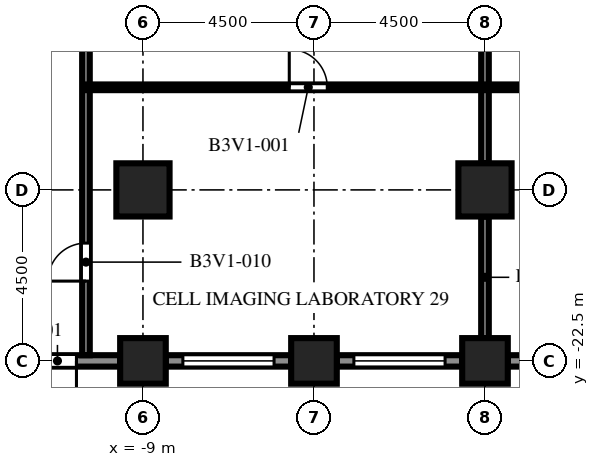
"""IFC4 building model, lengths in metres.
Left out: names, types, materials, properties, quantities, classifications, styles, units other than length and angle.
Written with IfcOpenShell. Run it as: python <this file> out.ifc"""

import sys

from ifc_helpers import new_model, si_unit, direction, frame, frame_2d, origin, origin_2d, place, context, subcontext, project, spatial, rectangle, extrude, element, fill, save


model = new_model("IFC4")
c1 = context("Model", 3, precision=1e-05, world=origin(), true_north=direction((0.0, 1.0)))
c2 = subcontext(c1, "Body", "Model", "MODEL_VIEW")
j1 = project(units=[si_unit("LENGTHUNIT", "METRE"), si_unit("PLANEANGLEUNIT", "RADIAN")], contexts=[c1])
p1 = place(None, origin())
s1 = spatial("IfcSite", under=j1, at=p1, CompositionType="ELEMENT")
p2 = place(p1, origin())
s2 = spatial("IfcBuilding", under=s1, at=p2, CompositionType="ELEMENT")
p3 = place(p2, frame((0.0, 0.0, 94.3)))
s3 = spatial("IfcBuildingStorey", under=s2, at=p3, CompositionType="ELEMENT", Elevation=94.3)
for number, where, z_axis, x_axis in (
    (1, (-9.0, -22.5, 0.0), (0.0, 0.0, 1.0), (1.0, 0.0, 0.0)),
    (2, (-4.5, -22.5, 0.0), (0.0, 0.0, 1.0), (1.0, 0.0, 0.0)),
    (3, (0.0, -22.5, 0.0), (0.0, 0.0, 1.0), (1.0, 0.0, 0.0)),
):
    element("IfcColumn", number, at=place(p3, frame(where, z_axis=z_axis, x_axis=x_axis)), inside=s3, PredefinedType="COLUMN", context=c2, shape_type="SweptSolid", body=[
        extrude(rectangle(XDim=1.2, YDim=1.2, at=origin_2d()), origin(), (0.0, 0.0, 1.0), 4.1),
    ])
for number, where, z_axis, x_axis in (
    (4, (-9.0, -18.0, 0.0), (0.0, 0.0, 1.0), (1.0, 0.0, 0.0)),
    (5, (0.0, -18.0, 0.0), (0.0, 0.0, 1.0), (1.0, 0.0, 0.0)),
):
    element("IfcColumn", number, at=place(p3, frame(where, z_axis=z_axis, x_axis=x_axis)), inside=s3, PredefinedType="COLUMN", context=c2, shape_type="SweptSolid", body=[
        extrude(rectangle(XDim=1.4, YDim=1.4, at=origin_2d()), origin(), (0.0, 0.0, 1.0), 4.1),
    ])
p4 = place(p3, frame((-9.6, -22.5, 0.0), z_axis=(0.0, 0.0, 1.0), x_axis=(-1.0, 0.0, 0.0)))
e6 = element("IfcWall", 6, at=p4, inside=s3, PredefinedType="SOLIDWALL", context=c2, shape_type="SweptSolid", body=[
    extrude(rectangle(XDim=3.3, YDim=0.3, at=frame_2d((1.65, 0.0))), origin(), (0.0, 0.0, 1.0), 2.75),
])
p5 = place(p4, frame((1.15, 0.0, 0.0)))
e7 = element("IfcOpeningElement", 7, at=p5, cuts=e6, PredefinedType="OPENING", context=c2, shape_type="SweptSolid", body=[
    extrude(rectangle(XDim=1.0, YDim=2.2, at=frame_2d((0.5, 1.1))), frame((0.0, 0.16, 0.0), z_axis=(0.0, -1.0, 0.0), x_axis=(1.0, 0.0, 0.0)), (0.0, 0.0, 1.0), 0.32),
])
p6 = place(p3, frame((-5.1, -22.5, 0.0), z_axis=(0.0, 0.0, 1.0), x_axis=(-1.0, 0.0, 0.0)))
e8 = element("IfcWall", 8, at=p6, inside=s3, PredefinedType="SOLIDWALL", context=c2, shape_type="SweptSolid", body=[
    extrude(rectangle(XDim=3.3, YDim=0.3, at=frame_2d((1.65, 0.0))), origin(), (0.0, 0.0, 1.0), 2.75),
])
p7 = place(p6, frame((0.45, 0.0, 0.8)))
e9 = element("IfcOpeningElement", 9, at=p7, cuts=e8, PredefinedType="OPENING", context=c2, shape_type="SweptSolid", body=[
    extrude(rectangle(XDim=2.4, YDim=1.7, at=frame_2d((1.2, 0.85))), frame((0.0, 0.16, 0.0), z_axis=(0.0, -1.0, 0.0), x_axis=(1.0, 0.0, 0.0)), (0.0, 0.0, 1.0), 0.32),
])
p8 = place(p3, frame((-0.6, -22.5, 0.0), z_axis=(0.0, 0.0, 1.0), x_axis=(-1.0, 0.0, 0.0)))
e10 = element("IfcWall", 10, at=p8, inside=s3, PredefinedType="SOLIDWALL", context=c2, shape_type="SweptSolid", body=[
    extrude(rectangle(XDim=3.3, YDim=0.3, at=frame_2d((1.65, 0.0))), origin(), (0.0, 0.0, 1.0), 2.75),
])
p9 = place(p8, frame((0.45, 0.0, 0.8)))
e11 = element("IfcOpeningElement", 11, at=p9, cuts=e10, PredefinedType="OPENING", context=c2, shape_type="SweptSolid", body=[
    extrude(rectangle(XDim=2.4, YDim=1.7, at=frame_2d((1.2, 0.85))), frame((0.0, 0.16, 0.0), z_axis=(0.0, -1.0, 0.0), x_axis=(1.0, 0.0, 0.0)), (0.0, 0.0, 1.0), 0.32),
])
p10 = place(p3, frame((3.9, -22.5, 0.0), z_axis=(0.0, 0.0, 1.0), x_axis=(-1.0, 0.0, 0.0)))
e12 = element("IfcWall", 12, at=p10, inside=s3, PredefinedType="SOLIDWALL", context=c2, shape_type="SweptSolid", body=[
    extrude(rectangle(XDim=3.3, YDim=0.3, at=frame_2d((1.65, 0.0))), origin(), (0.0, 0.0, 1.0), 2.75),
])
p11 = place(p10, frame((0.45, 0.0, 0.8)))
e13 = element("IfcOpeningElement", 13, at=p11, cuts=e12, PredefinedType="OPENING", context=c2, shape_type="SweptSolid", body=[
    extrude(rectangle(XDim=2.4, YDim=1.7, at=frame_2d((1.2, 0.85))), frame((0.0, 0.16, 0.0), z_axis=(0.0, -1.0, 0.0), x_axis=(1.0, 0.0, 0.0)), (0.0, 0.0, 1.0), 0.32),
])
p12 = place(p3, frame((-10.5, -9.0, 0.0), z_axis=(0.0, 0.0, 1.0), x_axis=(0.0, -1.0, 0.0)))
e14 = element("IfcWall", 14, at=p12, inside=s3, PredefinedType="PARTITIONING", context=c2, shape_type="SweptSolid", body=[
    extrude(rectangle(XDim=13.35, YDim=0.2, at=frame_2d((6.675, 0.0))), origin(), (0.0, 0.0, 1.0), 3.65),
])
p13 = place(p12, frame((10.4, 0.0, 0.0)))
e15 = element("IfcOpeningElement", 15, at=p13, cuts=e14, PredefinedType="OPENING", context=c2, shape_type="SweptSolid", body=[
    extrude(rectangle(XDim=1.0, YDim=2.1, at=frame_2d((0.5, 1.05))), frame((0.0, 0.11, 0.0), z_axis=(0.0, -1.0, 0.0), x_axis=(1.0, 0.0, 0.0)), (0.0, 0.0, 1.0), 0.22),
])
p14 = place(p3, frame((0.0, -21.9, 0.0), z_axis=(0.0, 0.0, 1.0), x_axis=(0.0, 1.0, 0.0)))
e16 = element("IfcWall", 16, at=p14, inside=s3, PredefinedType="PARTITIONING", context=c2, shape_type="SweptSolid", body=[
    extrude(rectangle(XDim=3.2, YDim=0.2, at=frame_2d((1.6, 0.0))), origin(), (0.0, 0.0, 1.0), 3.65),
])
p15 = place(p3, frame((0.0, -17.3, 0.0), z_axis=(0.0, 0.0, 1.0), x_axis=(0.0, 1.0, 0.0)))
e17 = element("IfcWall", 17, at=p15, inside=s3, PredefinedType="PARTITIONING", context=c2, shape_type="SweptSolid", body=[
    extrude(rectangle(XDim=8.3, YDim=0.2, at=frame_2d((4.15, 0.0))), origin(), (0.0, 0.0, 1.0), 3.65),
])
p16 = place(p3, frame((-10.5, -15.3, 0.0), z_axis=(0.0, 0.0, 1.0), x_axis=(1.0, 0.0, 0.0)))
e18 = element("IfcWall", 18, at=p16, inside=s3, PredefinedType="PARTITIONING", context=c2, shape_type="SweptSolid", body=[
    extrude(rectangle(XDim=28.5, YDim=0.15, at=frame_2d((14.25, 0.0))), origin(), (0.0, 0.0, 1.0), 3.65),
])
p17 = place(p16, frame((5.35, 0.0, 0.0)))
e19 = element("IfcOpeningElement", 19, at=p17, cuts=e18, PredefinedType="OPENING", context=c2, shape_type="SweptSolid", body=[
    extrude(rectangle(XDim=1.0, YDim=2.1, at=frame_2d((0.5, 1.05))), frame((0.0, 0.085, 0.0), z_axis=(0.0, -1.0, 0.0), x_axis=(1.0, 0.0, 0.0)), (0.0, 0.0, 1.0), 0.17),
])
p18 = place(p16, frame((18.1, 0.0, 0.0)))
e20 = element("IfcOpeningElement", 20, at=p18, cuts=e18, PredefinedType="OPENING", context=c2, shape_type="SweptSolid", body=[
    extrude(rectangle(XDim=1.0, YDim=2.1, at=frame_2d((0.5, 1.05))), frame((0.0, 0.085, 0.0), z_axis=(0.0, -1.0, 0.0), x_axis=(1.0, 0.0, 0.0)), (0.0, 0.0, 1.0), 0.17),
])
p19 = place(p16, frame((26.1, 0.0, 0.0)))
e21 = element("IfcOpeningElement", 21, at=p19, cuts=e18, PredefinedType="OPENING", context=c2, shape_type="SweptSolid", body=[
    extrude(rectangle(XDim=1.0, YDim=2.1, at=frame_2d((0.5, 1.05))), frame((0.0, 0.085, 0.0), z_axis=(0.0, -1.0, 0.0), x_axis=(1.0, 0.0, 0.0)), (0.0, 0.0, 1.0), 0.17),
])
p20 = place(p5, origin())
e22 = element("IfcDoor", 22, at=p20, inside=s3, OperationType="SINGLE_SWING_LEFT", PredefinedType="DOOR", context=c2, shape_type="SweptSolid", body=[
    extrude(rectangle(XDim=1.0, YDim=2.2, at=frame_2d((0.5, 1.1))), frame((0.0, 0.025, 0.0), z_axis=(0.0, -1.0, 0.0), x_axis=(1.0, 0.0, 0.0)), (0.0, 0.0, 1.0), 0.05),
])
fill(e7, e22)
p21 = place(p7, origin())
e23 = element("IfcWindow", 23, at=p21, inside=s3, PartitioningType="SINGLE_PANEL", PredefinedType="WINDOW", context=c2, shape_type="SweptSolid", body=[
    extrude(rectangle(XDim=2.4, YDim=1.7, at=frame_2d((1.2, 0.85))), frame((0.0, 0.03, 0.0), z_axis=(0.0, -1.0, 0.0), x_axis=(1.0, 0.0, 0.0)), (0.0, 0.0, 1.0), 0.06),
])
fill(e9, e23)
p22 = place(p9, origin())
e24 = element("IfcWindow", 24, at=p22, inside=s3, PartitioningType="SINGLE_PANEL", PredefinedType="WINDOW", context=c2, shape_type="SweptSolid", body=[
    extrude(rectangle(XDim=2.4, YDim=1.7, at=frame_2d((1.2, 0.85))), frame((0.0, 0.03, 0.0), z_axis=(0.0, -1.0, 0.0), x_axis=(1.0, 0.0, 0.0)), (0.0, 0.0, 1.0), 0.06),
])
fill(e11, e24)
p23 = place(p17, origin())
e25 = element("IfcDoor", 25, at=p23, inside=s3, OperationType="SINGLE_SWING_LEFT", PredefinedType="DOOR", context=c2, shape_type="SweptSolid", body=[
    extrude(rectangle(XDim=1.0, YDim=2.1, at=frame_2d((0.5, 1.05))), frame((0.0, 0.025, 0.0), z_axis=(0.0, -1.0, 0.0), x_axis=(1.0, 0.0, 0.0)), (0.0, 0.0, 1.0), 0.05),
])
fill(e19, e25)
p24 = place(p13, origin())
e26 = element("IfcDoor", 26, at=p24, inside=s3, OperationType="SINGLE_SWING_RIGHT", PredefinedType="DOOR", context=c2, shape_type="SweptSolid", body=[
    extrude(rectangle(XDim=1.0, YDim=2.1, at=frame_2d((0.5, 1.05))), frame((0.0, 0.025, 0.0), z_axis=(0.0, -1.0, 0.0), x_axis=(1.0, 0.0, 0.0)), (0.0, 0.0, 1.0), 0.05),
])
fill(e15, e26)
save(model, sys.argv[1])
